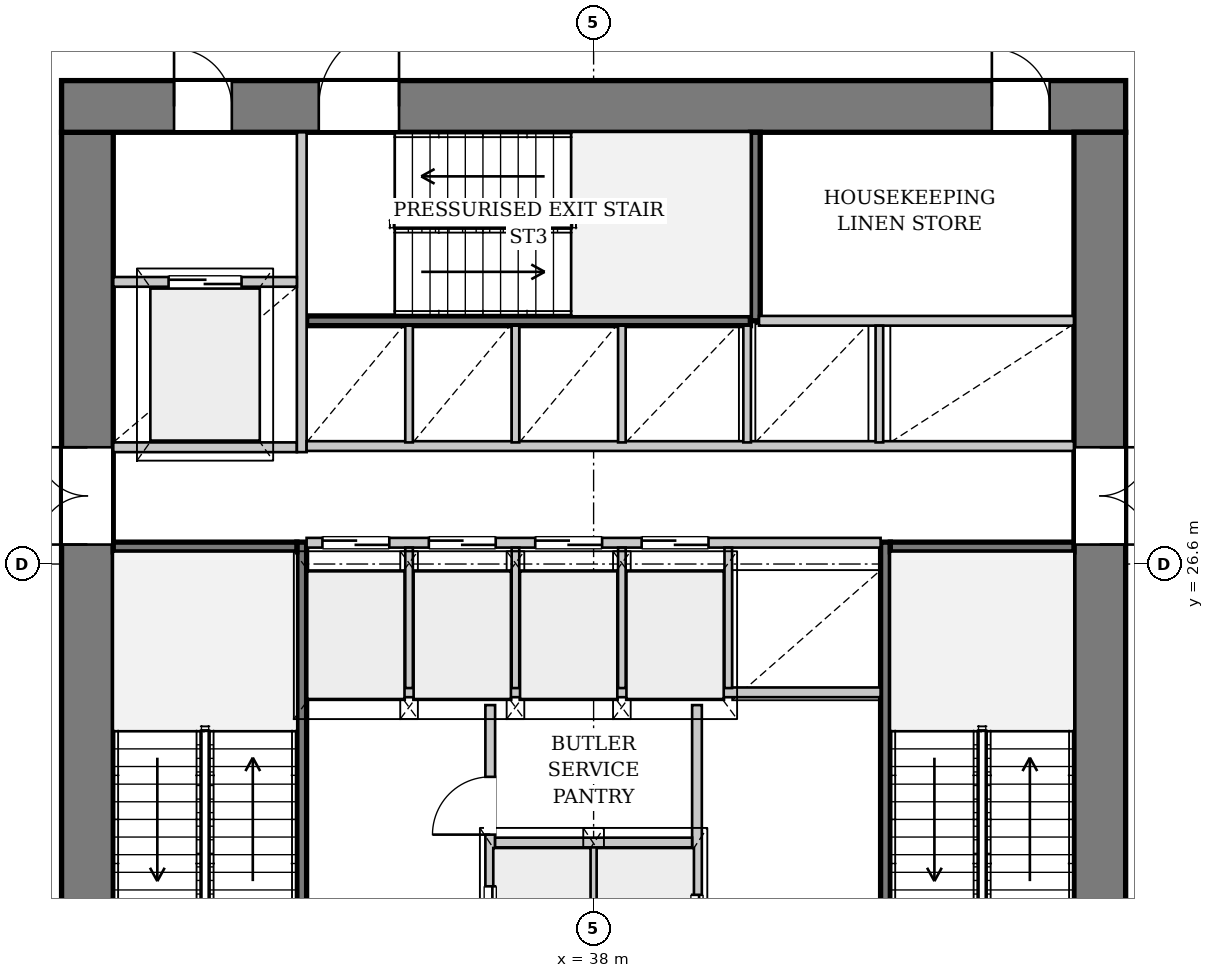
"""IFC4 building model, lengths in metres.
Left out: names, types, materials, properties, quantities, classifications, styles, units other than length and angle.
Written with IfcOpenShell. Run it as: python <this file> out.ifc"""

import sys

from ifc_helpers import new_model, si_unit, direction, frame, frame_2d, origin, place, context, subcontext, project, spatial, rectangle, extrude, source, transform, mapped, element, fill, save


model = new_model("IFC4")
c1 = context("Model", 3, precision=1e-05, world=origin(), true_north=direction((0.0, 1.0)))
c2 = subcontext(c1, "Body", "Model", "MODEL_VIEW")
j1 = project(units=[si_unit("LENGTHUNIT", "METRE"), si_unit("PLANEANGLEUNIT", "RADIAN")], contexts=[c1])
p1 = place(None, origin())
s1 = spatial("IfcSite", under=j1, at=p1, CompositionType="ELEMENT")
p2 = place(p1, origin())
s2 = spatial("IfcBuilding", under=s1, at=p2, CompositionType="ELEMENT")
p3 = place(p2, frame((0.0, 0.0, 50.6)))
s3 = spatial("IfcBuildingStorey", under=s2, at=p3, CompositionType="ELEMENT", Elevation=50.6)
p4 = place(p3, frame((29.675, 19.5, 0.0), z_axis=(0.0, 0.0, 1.0), x_axis=(0.0, 1.0, 0.0)))
e1 = element("IfcWall", 1, at=p4, inside=s3, PredefinedType="SHEAR", context=c2, shape_type="SweptSolid", body=[
    extrude(rectangle(XDim=14.2, YDim=0.85, at=frame_2d((7.1, 0.0))), origin(), (0.0, 0.0, 1.0), 3.3),
])
p5 = place(p4, frame((7.42, 0.0, 0.0)))
e2 = element("IfcOpeningElement", 2, at=p5, cuts=e1, PredefinedType="OPENING", context=c2, shape_type="SweptSolid", body=[
    extrude(rectangle(XDim=1.6, YDim=2.2, at=frame_2d((0.8, 1.1))), frame((0.0, 0.435, 0.0), z_axis=(0.0, -1.0, 0.0), x_axis=(1.0, 0.0, 0.0)), (0.0, 0.0, 1.0), 0.87),
])
p6 = place(p3, frame((29.25, 34.125, 0.0), z_axis=(0.0, 0.0, 1.0), x_axis=(1.0, 0.0, 0.0)))
e3 = element("IfcWall", 3, at=p6, inside=s3, PredefinedType="SHEAR", context=c2, shape_type="SweptSolid", body=[
    extrude(rectangle(XDim=17.5, YDim=0.85, at=frame_2d((8.75, 0.0))), origin(), (0.0, 0.0, 1.0), 3.3),
])
p7 = place(p6, frame((1.85, 0.0, 0.0)))
e4 = element("IfcOpeningElement", 4, at=p7, cuts=e3, PredefinedType="OPENING", context=c2, shape_type="SweptSolid", body=[
    extrude(rectangle(XDim=0.95, YDim=2.1, at=frame_2d((0.475, 1.05))), frame((0.0, 0.435, 0.0), z_axis=(0.0, -1.0, 0.0), x_axis=(1.0, 0.0, 0.0)), (0.0, 0.0, 1.0), 0.87),
])
p8 = place(p6, frame((4.23, 0.0, 0.0)))
e5 = element("IfcOpeningElement", 5, at=p8, cuts=e3, PredefinedType="OPENING", context=c2, shape_type="SweptSolid", body=[
    extrude(rectangle(XDim=1.32, YDim=2.2, at=frame_2d((0.66, 1.1))), frame((0.0, 0.435, 0.0), z_axis=(0.0, -1.0, 0.0), x_axis=(1.0, 0.0, 0.0)), (0.0, 0.0, 1.0), 0.87),
])
p9 = place(p6, frame((15.3, 0.0, 0.0)))
e6 = element("IfcOpeningElement", 6, at=p9, cuts=e3, PredefinedType="OPENING", context=c2, shape_type="SweptSolid", body=[
    extrude(rectangle(XDim=0.95, YDim=2.1, at=frame_2d((0.475, 1.05))), frame((0.0, 0.435, 0.0), z_axis=(0.0, -1.0, 0.0), x_axis=(1.0, 0.0, 0.0)), (0.0, 0.0, 1.0), 0.87),
])
p10 = place(p3, frame((46.325, 33.7, 0.0), z_axis=(0.0, 0.0, 1.0), x_axis=(0.0, -1.0, 0.0)))
e7 = element("IfcWall", 7, at=p10, inside=s3, PredefinedType="SHEAR", context=c2, shape_type="SweptSolid", body=[
    extrude(rectangle(XDim=14.2, YDim=0.85, at=frame_2d((7.1, 0.0))), origin(), (0.0, 0.0, 1.0), 3.3),
])
p11 = place(p10, frame((5.18, 0.0, 0.0)))
e8 = element("IfcOpeningElement", 8, at=p11, cuts=e7, PredefinedType="OPENING", context=c2, shape_type="SweptSolid", body=[
    extrude(rectangle(XDim=1.6, YDim=2.2, at=frame_2d((0.8, 1.1))), frame((0.0, 0.435, 0.0), z_axis=(0.0, -1.0, 0.0), x_axis=(1.0, 0.0, 0.0)), (0.0, 0.0, 1.0), 0.87),
])
p12 = place(p3, frame((33.2, 19.5, 0.0), z_axis=(0.0, 0.0, 1.0), x_axis=(0.0, 1.0, 0.0)))
e9 = element("IfcWall", 9, at=p12, inside=s3, PredefinedType="PARTITIONING", context=c2, shape_type="SweptSolid", body=[
    extrude(rectangle(XDim=7.46, YDim=0.16, at=frame_2d((3.73, 0.0))), origin(), (0.0, 0.0, 1.0), 3.3),
])
p13 = place(p12, frame((0.08, 0.0, 0.0)))
e10 = element("IfcOpeningElement", 10, at=p13, cuts=e9, PredefinedType="OPENING", context=c2, shape_type="SweptSolid", body=[
    extrude(rectangle(XDim=1.32, YDim=2.2, at=frame_2d((0.66, 1.1))), frame((0.0, 0.09, 0.0), z_axis=(0.0, -1.0, 0.0), x_axis=(1.0, 0.0, 0.0)), (0.0, 0.0, 1.0), 0.18),
])
p14 = place(p3, frame((30.1, 26.88, 0.0), z_axis=(0.0, 0.0, 1.0), x_axis=(1.0, 0.0, 0.0)))
e11 = element("IfcWall", 11, at=p14, inside=s3, PredefinedType="PARTITIONING", context=c2, shape_type="SweptSolid", body=[
    extrude(rectangle(XDim=3.02, YDim=0.16, at=frame_2d((1.51, 0.0))), origin(), (0.0, 0.0, 1.0), 3.3),
])
p15 = place(p3, frame((42.8, 26.96, 0.0), z_axis=(0.0, 0.0, 1.0), x_axis=(0.0, -1.0, 0.0)))
e12 = element("IfcWall", 12, at=p15, inside=s3, PredefinedType="PARTITIONING", context=c2, shape_type="SweptSolid", body=[
    extrude(rectangle(XDim=7.46, YDim=0.16, at=frame_2d((3.73, 0.0))), origin(), (0.0, 0.0, 1.0), 3.3),
])
p16 = place(p15, frame((6.06, 0.0, 0.0)))
e13 = element("IfcOpeningElement", 13, at=p16, cuts=e12, PredefinedType="OPENING", context=c2, shape_type="SweptSolid", body=[
    extrude(rectangle(XDim=1.32, YDim=2.2, at=frame_2d((0.66, 1.1))), frame((0.0, 0.09, 0.0), z_axis=(0.0, -1.0, 0.0), x_axis=(1.0, 0.0, 0.0)), (0.0, 0.0, 1.0), 0.18),
])
p17 = place(p3, frame((42.88, 26.88, 0.0), z_axis=(0.0, 0.0, 1.0), x_axis=(1.0, 0.0, 0.0)))
e14 = element("IfcWall", 14, at=p17, inside=s3, PredefinedType="PARTITIONING", context=c2, shape_type="SweptSolid", body=[
    extrude(rectangle(XDim=3.02, YDim=0.16, at=frame_2d((1.51, 0.0))), origin(), (0.0, 0.0, 1.0), 3.3),
])
p18 = place(p3, frame((33.28, 30.6, 0.0), z_axis=(0.0, 0.0, 1.0), x_axis=(1.0, 0.0, 0.0)))
e15 = element("IfcWall", 15, at=p18, inside=s3, PredefinedType="PARTITIONING", context=c2, shape_type="SweptSolid", body=[
    extrude(rectangle(XDim=7.3, YDim=0.16, at=frame_2d((3.65, 0.0))), origin(), (0.0, 0.0, 1.0), 3.3),
])
p19 = place(p3, frame((40.66, 30.6, 0.0), z_axis=(0.0, 0.0, 1.0), x_axis=(0.0, 1.0, 0.0)))
e16 = element("IfcWall", 16, at=p19, inside=s3, PredefinedType="PARTITIONING", context=c2, shape_type="SweptSolid", body=[
    extrude(rectangle(XDim=3.1, YDim=0.16, at=frame_2d((1.55, 0.0))), origin(), (0.0, 0.0, 1.0), 3.3),
])
p20 = place(p3, frame((36.3, 19.5, 0.0), z_axis=(0.0, 0.0, 1.0), x_axis=(0.0, 1.0, 0.0)))
e17 = element("IfcWall", 17, at=p20, inside=s3, PredefinedType="PARTITIONING", context=c2, shape_type="SweptSolid", body=[
    extrude(rectangle(XDim=4.78, YDim=0.16, at=frame_2d((2.39, 0.0))), origin(), (0.0, 0.0, 1.0), 3.3),
])
p21 = place(p20, frame((0.6, 0.0, 0.0)))
e18 = element("IfcOpeningElement", 18, at=p21, cuts=e17, PredefinedType="OPENING", context=c2, shape_type="SweptSolid", body=[
    extrude(rectangle(XDim=1.2, YDim=2.2, at=frame_2d((0.6, 1.1))), frame((0.0, 0.09, 0.0), z_axis=(0.0, -1.0, 0.0), x_axis=(1.0, 0.0, 0.0)), (0.0, 0.0, 1.0), 0.18),
])
p22 = place(p20, frame((2.65, 0.0, 0.0)))
e19 = element("IfcOpeningElement", 19, at=p22, cuts=e17, PredefinedType="OPENING", context=c2, shape_type="SweptSolid", body=[
    extrude(rectangle(XDim=0.95, YDim=2.1, at=frame_2d((0.475, 1.05))), frame((0.0, 0.09, 0.0), z_axis=(0.0, -1.0, 0.0), x_axis=(1.0, 0.0, 0.0)), (0.0, 0.0, 1.0), 0.18),
])
p23 = place(p3, frame((39.7, 24.28, 0.0), z_axis=(0.0, 0.0, 1.0), x_axis=(0.0, -1.0, 0.0)))
e20 = element("IfcWall", 20, at=p23, inside=s3, PredefinedType="PARTITIONING", context=c2, shape_type="SweptSolid", body=[
    extrude(rectangle(XDim=4.78, YDim=0.16, at=frame_2d((2.39, 0.0))), origin(), (0.0, 0.0, 1.0), 3.3),
])
p24 = place(p23, frame((3.12, 0.0, 0.0)))
e21 = element("IfcOpeningElement", 21, at=p24, cuts=e20, PredefinedType="OPENING", context=c2, shape_type="SweptSolid", body=[
    extrude(rectangle(XDim=1.2, YDim=2.2, at=frame_2d((0.6, 1.1))), frame((0.0, 0.09, 0.0), z_axis=(0.0, -1.0, 0.0), x_axis=(1.0, 0.0, 0.0)), (0.0, 0.0, 1.0), 0.18),
])
p25 = place(p3, frame((38.0, 19.5, 0.0), z_axis=(0.0, 0.0, 1.0), x_axis=(0.0, 1.0, 0.0)))
e22 = element("IfcWall", 22, at=p25, inside=s3, PredefinedType="PARTITIONING", context=c2, shape_type="SweptSolid", body=[
    extrude(rectangle(XDim=2.46, YDim=0.125, at=frame_2d((1.23, 0.0))), origin(), (0.0, 0.0, 1.0), 3.3),
])
p26 = place(p3, frame((36.38, 22.02, 0.0), z_axis=(0.0, 0.0, 1.0), x_axis=(1.0, 0.0, 0.0)))
e23 = element("IfcWall", 23, at=p26, inside=s3, PredefinedType="PARTITIONING", context=c2, shape_type="SweptSolid", body=[
    extrude(rectangle(XDim=3.24, YDim=0.16, at=frame_2d((1.62, 0.0))), origin(), (0.0, 0.0, 1.0), 3.3),
])
p27 = place(p3, frame((33.28, 24.49, 0.0), z_axis=(0.0, 0.0, 1.0), x_axis=(1.0, 0.0, 0.0)))
e24 = element("IfcWall", 24, at=p27, inside=s3, PredefinedType="PARTITIONING", context=c2, shape_type="SweptSolid", body=[
    extrude(rectangle(XDim=9.44, YDim=0.16, at=frame_2d((4.72, 0.0))), origin(), (0.0, 0.0, 1.0), 3.3),
])
p28 = place(p3, frame((30.1, 28.52, 0.0), z_axis=(0.0, 0.0, 1.0), x_axis=(1.0, 0.0, 0.0)))
e25 = element("IfcWall", 25, at=p28, inside=s3, PredefinedType="PARTITIONING", context=c2, shape_type="SweptSolid", body=[
    extrude(rectangle(XDim=3.02, YDim=0.16, at=frame_2d((1.51, 0.0))), origin(), (0.0, 0.0, 1.0), 3.3),
])
p29 = place(p3, frame((33.2, 28.44, 0.0), z_axis=(0.0, 0.0, 1.0), x_axis=(0.0, 1.0, 0.0)))
e26 = element("IfcWall", 26, at=p29, inside=s3, PredefinedType="PARTITIONING", context=c2, shape_type="SweptSolid", body=[
    extrude(rectangle(XDim=5.26, YDim=0.16, at=frame_2d((2.63, 0.0))), origin(), (0.0, 0.0, 1.0), 3.3),
])
p30 = place(p3, frame((30.1, 31.24, 0.0), z_axis=(0.0, 0.0, 1.0), x_axis=(1.0, 0.0, 0.0)))
e27 = element("IfcWall", 27, at=p30, inside=s3, PredefinedType="PARTITIONING", context=c2, shape_type="SweptSolid", body=[
    extrude(rectangle(XDim=3.02, YDim=0.16, at=frame_2d((1.51, 0.0))), origin(), (0.0, 0.0, 1.0), 3.3),
])
p31 = place(p30, frame((0.91, 0.0, 0.0)))
e28 = element("IfcOpeningElement", 28, at=p31, cuts=e27, PredefinedType="OPENING", context=c2, shape_type="SweptSolid", body=[
    extrude(rectangle(XDim=1.2, YDim=2.2, at=frame_2d((0.6, 1.1))), frame((0.0, 0.09, 0.0), z_axis=(0.0, -1.0, 0.0), x_axis=(1.0, 0.0, 0.0)), (0.0, 0.0, 1.0), 0.18),
])
p32 = place(p3, frame((33.28, 26.95, 0.0), z_axis=(0.0, 0.0, 1.0), x_axis=(1.0, 0.0, 0.0)))
e29 = element("IfcWall", 29, at=p32, inside=s3, PredefinedType="PARTITIONING", context=c2, shape_type="SweptSolid", body=[
    extrude(rectangle(XDim=9.44, YDim=0.16, at=frame_2d((4.72, 0.0))), origin(), (0.0, 0.0, 1.0), 3.3),
])
p33 = place(p32, frame((0.26, 0.0, 0.0)))
e30 = element("IfcOpeningElement", 30, at=p33, cuts=e29, PredefinedType="OPENING", context=c2, shape_type="SweptSolid", body=[
    extrude(rectangle(XDim=1.1, YDim=2.2, at=frame_2d((0.55, 1.1))), frame((0.0, 0.09, 0.0), z_axis=(0.0, -1.0, 0.0), x_axis=(1.0, 0.0, 0.0)), (0.0, 0.0, 1.0), 0.18),
])
p34 = place(p32, frame((2.01, 0.0, 0.0)))
e31 = element("IfcOpeningElement", 31, at=p34, cuts=e29, PredefinedType="OPENING", context=c2, shape_type="SweptSolid", body=[
    extrude(rectangle(XDim=1.1, YDim=2.2, at=frame_2d((0.55, 1.1))), frame((0.0, 0.09, 0.0), z_axis=(0.0, -1.0, 0.0), x_axis=(1.0, 0.0, 0.0)), (0.0, 0.0, 1.0), 0.18),
])
p35 = place(p32, frame((3.76, 0.0, 0.0)))
e32 = element("IfcOpeningElement", 32, at=p35, cuts=e29, PredefinedType="OPENING", context=c2, shape_type="SweptSolid", body=[
    extrude(rectangle(XDim=1.1, YDim=2.2, at=frame_2d((0.55, 1.1))), frame((0.0, 0.09, 0.0), z_axis=(0.0, -1.0, 0.0), x_axis=(1.0, 0.0, 0.0)), (0.0, 0.0, 1.0), 0.18),
])
p36 = place(p32, frame((5.51, 0.0, 0.0)))
e33 = element("IfcOpeningElement", 33, at=p36, cuts=e29, PredefinedType="OPENING", context=c2, shape_type="SweptSolid", body=[
    extrude(rectangle(XDim=1.1, YDim=2.2, at=frame_2d((0.55, 1.1))), frame((0.0, 0.09, 0.0), z_axis=(0.0, -1.0, 0.0), x_axis=(1.0, 0.0, 0.0)), (0.0, 0.0, 1.0), 0.18),
])
for number, where, z_axis, x_axis in (
    (34, (34.965, 24.56, 0.0), (0.0, 0.0, 1.0), (0.0, 1.0, 0.0)),
    (35, (36.715, 24.56, 0.0), (0.0, 0.0, 1.0), (0.0, 1.0, 0.0)),
    (36, (38.465, 24.56, 0.0), (0.0, 0.0, 1.0), (0.0, 1.0, 0.0)),
    (37, (40.215, 24.56, 0.0), (0.0, 0.0, 1.0), (0.0, 1.0, 0.0)),
):
    element("IfcWall", number, at=place(p3, frame(where, z_axis=z_axis, x_axis=x_axis)), inside=s3, PredefinedType="PARTITIONING", context=c2, shape_type="SweptSolid", body=[
        extrude(rectangle(XDim=2.31, YDim=0.125, at=frame_2d((1.155, 0.0))), origin(), (0.0, 0.0, 1.0), 3.3),
    ])
p37 = place(p3, frame((33.28, 28.54, 0.0), z_axis=(0.0, 0.0, 1.0), x_axis=(1.0, 0.0, 0.0)))
e38 = element("IfcWall", 38, at=p37, inside=s3, PredefinedType="PARTITIONING", context=c2, shape_type="SweptSolid", body=[
    extrude(rectangle(XDim=12.62, YDim=0.16, at=frame_2d((6.31, 0.0))), origin(), (0.0, 0.0, 1.0), 3.3),
])
p38 = place(p3, frame((40.72, 30.6, 0.0), z_axis=(0.0, 0.0, 1.0), x_axis=(1.0, 0.0, 0.0)))
e39 = element("IfcWall", 39, at=p38, inside=s3, PredefinedType="PARTITIONING", context=c2, shape_type="SweptSolid", body=[
    extrude(rectangle(XDim=5.18, YDim=0.16, at=frame_2d((2.59, 0.0))), origin(), (0.0, 0.0, 1.0), 3.3),
])
for number, where, z_axis, x_axis in (
    (40, (34.965, 28.6, 0.0), (0.0, 0.0, 1.0), (0.0, 1.0, 0.0)),
    (41, (36.715, 28.6, 0.0), (0.0, 0.0, 1.0), (0.0, 1.0, 0.0)),
    (42, (38.465, 28.6, 0.0), (0.0, 0.0, 1.0), (0.0, 1.0, 0.0)),
    (43, (40.525, 28.6, 0.0), (0.0, 0.0, 1.0), (0.0, 1.0, 0.0)),
    (44, (42.7, 28.6, 0.0), (0.0, 0.0, 1.0), (0.0, 1.0, 0.0)),
):
    element("IfcWall", number, at=place(p3, frame(where, z_axis=z_axis, x_axis=x_axis)), inside=s3, PredefinedType="PARTITIONING", context=c2, shape_type="SweptSolid", body=[
        extrude(rectangle(XDim=1.92, YDim=0.125, at=frame_2d((0.96, 0.0))), origin(), (0.0, 0.0, 1.0), 3.3),
    ])
m1 = source(origin(), c2, "Body", "SweptSolid", [
    extrude(rectangle(XDim=1.6, YDim=2.2, at=frame_2d((0.8, 1.1))), frame((0.0, 0.025, 0.0), z_axis=(0.0, -1.0, 0.0), x_axis=(1.0, 0.0, 0.0)), (0.0, 0.0, 1.0), 0.05),
])
p39 = place(p5, origin())
e45 = element("IfcDoor", 45, at=p39, inside=s3, OperationType="DOUBLE_DOOR_SINGLE_SWING", PredefinedType="DOOR", context=c2, shape_type="MappedRepresentation", body=[
    mapped(m1, transform((0.0, 0.0, 0.0), x_axis=(1.0, 0.0, 0.0), y_axis=(0.0, 1.0, 0.0), z_axis=(0.0, 0.0, 1.0), scale=1.0)),
])
fill(e2, e45)
m2 = source(origin(), c2, "Body", "SweptSolid", [
    extrude(rectangle(XDim=0.95, YDim=2.1, at=frame_2d((0.475, 1.05))), frame((0.0, 0.025, 0.0), z_axis=(0.0, -1.0, 0.0), x_axis=(1.0, 0.0, 0.0)), (0.0, 0.0, 1.0), 0.05),
])
p40 = place(p7, origin())
e46 = element("IfcDoor", 46, at=p40, inside=s3, OperationType="SINGLE_SWING_LEFT", PredefinedType="DOOR", context=c2, shape_type="MappedRepresentation", body=[
    mapped(m2, transform((0.0, 0.0, 0.0), x_axis=(1.0, 0.0, 0.0), y_axis=(0.0, 1.0, 0.0), z_axis=(0.0, 0.0, 1.0), scale=1.0)),
])
fill(e4, e46)
m3 = source(origin(), c2, "Body", "SweptSolid", [
    extrude(rectangle(XDim=1.32, YDim=2.2, at=frame_2d((0.66, 1.1))), frame((0.0, 0.025, 0.0), z_axis=(0.0, -1.0, 0.0), x_axis=(1.0, 0.0, 0.0)), (0.0, 0.0, 1.0), 0.05),
])
p41 = place(p8, origin())
e47 = element("IfcDoor", 47, at=p41, inside=s3, OperationType="SINGLE_SWING_RIGHT", PredefinedType="DOOR", context=c2, shape_type="MappedRepresentation", body=[
    mapped(m3, transform((0.0, 0.0, 0.0), x_axis=(1.0, 0.0, 0.0), y_axis=(0.0, 1.0, 0.0), z_axis=(0.0, 0.0, 1.0), scale=1.0)),
])
fill(e5, e47)
p42 = place(p11, origin())
e48 = element("IfcDoor", 48, at=p42, inside=s3, OperationType="DOUBLE_DOOR_SINGLE_SWING", PredefinedType="DOOR", context=c2, shape_type="MappedRepresentation", body=[
    mapped(m1, transform((0.0, 0.0, 0.0), x_axis=(1.0, 0.0, 0.0), y_axis=(0.0, 1.0, 0.0), z_axis=(0.0, 0.0, 1.0), scale=1.0)),
])
fill(e8, e48)
m4 = source(origin(), c2, "Body", "SweptSolid", [
    extrude(rectangle(XDim=1.2, YDim=2.2, at=frame_2d((0.6, 1.1))), frame((0.0, 0.025, 0.0), z_axis=(0.0, -1.0, 0.0), x_axis=(1.0, 0.0, 0.0)), (0.0, 0.0, 1.0), 0.05),
])
p43 = place(p21, origin())
e49 = element("IfcDoor", 49, at=p43, inside=s3, OperationType="DOUBLE_DOOR_SLIDING", PredefinedType="DOOR", context=c2, shape_type="MappedRepresentation", body=[
    mapped(m4, transform((0.0, 0.0, 0.0), x_axis=(1.0, 0.0, 0.0), y_axis=(0.0, 1.0, 0.0), z_axis=(0.0, 0.0, 1.0), scale=1.0)),
])
fill(e18, e49)
p44 = place(p22, origin())
e50 = element("IfcDoor", 50, at=p44, inside=s3, OperationType="SINGLE_SWING_LEFT", PredefinedType="DOOR", context=c2, shape_type="MappedRepresentation", body=[
    mapped(m2, transform((0.0, 0.0, 0.0), x_axis=(1.0, 0.0, 0.0), y_axis=(0.0, 1.0, 0.0), z_axis=(0.0, 0.0, 1.0), scale=1.0)),
])
fill(e19, e50)
p45 = place(p24, origin())
e51 = element("IfcDoor", 51, at=p45, inside=s3, OperationType="DOUBLE_DOOR_SLIDING", PredefinedType="DOOR", context=c2, shape_type="MappedRepresentation", body=[
    mapped(m4, transform((0.0, 0.0, 0.0), x_axis=(1.0, 0.0, 0.0), y_axis=(0.0, 1.0, 0.0), z_axis=(0.0, 0.0, 1.0), scale=1.0)),
])
fill(e21, e51)
p46 = place(p31, origin())
e52 = element("IfcDoor", 52, at=p46, inside=s3, OperationType="DOUBLE_DOOR_SLIDING", PredefinedType="DOOR", context=c2, shape_type="MappedRepresentation", body=[
    mapped(m4, transform((0.0, 0.0, 0.0), x_axis=(1.0, 0.0, 0.0), y_axis=(0.0, 1.0, 0.0), z_axis=(0.0, 0.0, 1.0), scale=1.0)),
])
fill(e28, e52)
m5 = source(origin(), c2, "Body", "SweptSolid", [
    extrude(rectangle(XDim=1.1, YDim=2.2, at=frame_2d((0.55, 1.1))), frame((0.0, 0.025, 0.0), z_axis=(0.0, -1.0, 0.0), x_axis=(1.0, 0.0, 0.0)), (0.0, 0.0, 1.0), 0.05),
])
p47 = place(p33, origin())
e53 = element("IfcDoor", 53, at=p47, inside=s3, OperationType="DOUBLE_DOOR_SLIDING", PredefinedType="DOOR", context=c2, shape_type="MappedRepresentation", body=[
    mapped(m5, transform((0.0, 0.0, 0.0), x_axis=(1.0, 0.0, 0.0), y_axis=(0.0, 1.0, 0.0), z_axis=(0.0, 0.0, 1.0), scale=1.0)),
])
fill(e30, e53)
p48 = place(p34, origin())
e54 = element("IfcDoor", 54, at=p48, inside=s3, OperationType="DOUBLE_DOOR_SLIDING", PredefinedType="DOOR", context=c2, shape_type="MappedRepresentation", body=[
    mapped(m5, transform((0.0, 0.0, 0.0), x_axis=(1.0, 0.0, 0.0), y_axis=(0.0, 1.0, 0.0), z_axis=(0.0, 0.0, 1.0), scale=1.0)),
])
fill(e31, e54)
p49 = place(p35, origin())
e55 = element("IfcDoor", 55, at=p49, inside=s3, OperationType="DOUBLE_DOOR_SLIDING", PredefinedType="DOOR", context=c2, shape_type="MappedRepresentation", body=[
    mapped(m5, transform((0.0, 0.0, 0.0), x_axis=(1.0, 0.0, 0.0), y_axis=(0.0, 1.0, 0.0), z_axis=(0.0, 0.0, 1.0), scale=1.0)),
])
fill(e32, e55)
p50 = place(p36, origin())
e56 = element("IfcDoor", 56, at=p50, inside=s3, OperationType="DOUBLE_DOOR_SLIDING", PredefinedType="DOOR", context=c2, shape_type="MappedRepresentation", body=[
    mapped(m5, transform((0.0, 0.0, 0.0), x_axis=(1.0, 0.0, 0.0), y_axis=(0.0, 1.0, 0.0), z_axis=(0.0, 0.0, 1.0), scale=1.0)),
])
fill(e33, e56)
p51 = place(p9, origin())
e57 = element("IfcDoor", 57, at=p51, inside=s3, OperationType="SINGLE_SWING_LEFT", PredefinedType="DOOR", context=c2, shape_type="MappedRepresentation", body=[
    mapped(m2, transform((0.0, 0.0, 0.0), x_axis=(1.0, 0.0, 0.0), y_axis=(0.0, 1.0, 0.0), z_axis=(0.0, 0.0, 1.0), scale=1.0)),
])
fill(e6, e57)
save(model, sys.argv[1])
